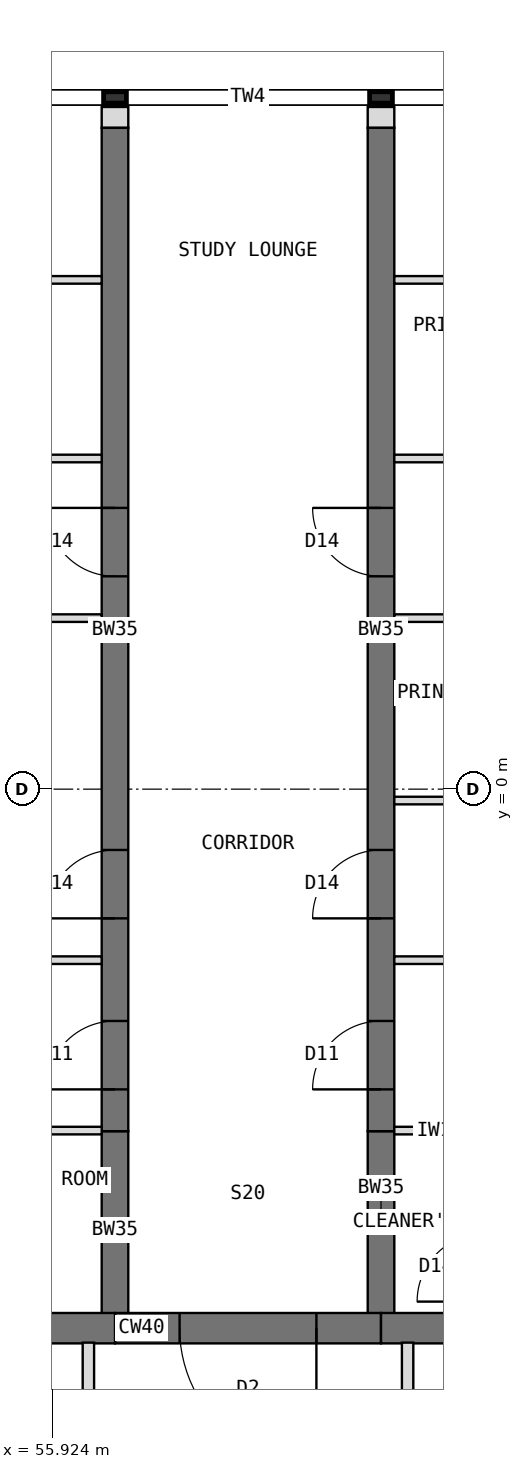
"""IFC4 building model, lengths in metres.
Left out: names, types, materials, properties, quantities, classifications, styles, units other than length and angle.
Written with IfcOpenShell. Run it as: python <this file> out.ifc"""

import sys

from ifc_helpers import new_model, si_unit, direction, frame, frame_2d, origin, place, context, subcontext, project, spatial, rectangle, extrude, element, fill, save


model = new_model("IFC4")
c1 = context("Model", 3, precision=1e-05, world=origin(), true_north=direction((0.0, 1.0)))
c2 = subcontext(c1, "Body", "Model", "MODEL_VIEW")
j1 = project(units=[si_unit("LENGTHUNIT", "METRE"), si_unit("PLANEANGLEUNIT", "RADIAN")], contexts=[c1])
p1 = place(None, origin())
s1 = spatial("IfcSite", under=j1, at=p1, CompositionType="ELEMENT")
p2 = place(p1, origin())
s2 = spatial("IfcBuilding", under=s1, at=p2, CompositionType="ELEMENT")
p3 = place(p2, frame((0.0, 0.0, 287.5)))
s3 = spatial("IfcBuildingStorey", under=s2, at=p3, CompositionType="ELEMENT", Elevation=287.5)
p4 = place(p3, frame((64.798, -7.092, 0.0), z_axis=(0.0, 0.0, 1.0), x_axis=(-1.0, 0.0, 0.0)))
e1 = element("IfcWall", 1, at=p4, inside=s3, PredefinedType="SHEAR", context=c2, shape_type="SweptSolid", body=[
    extrude(rectangle(XDim=4.548, YDim=0.4, at=frame_2d((2.274, 0.0))), origin(), (0.0, 0.0, 1.0), 4.0),
])
p5 = place(p3, frame((60.25, -7.092, 0.0), z_axis=(0.0, 0.0, 1.0), x_axis=(-1.0, 0.0, 0.0)))
e2 = element("IfcWall", 2, at=p5, inside=s3, PredefinedType="SHEAR", context=c2, shape_type="SweptSolid", body=[
    extrude(rectangle(XDim=3.5, YDim=0.4, at=frame_2d((1.75, 0.0))), origin(), (0.0, 0.0, 1.0), 4.0),
])
p6 = place(p5, frame((0.85, 0.0, 0.0)))
e3 = element("IfcOpeningElement", 3, at=p6, cuts=e2, PredefinedType="OPENING", context=c2, shape_type="SweptSolid", body=[
    extrude(rectangle(XDim=1.8, YDim=2.1, at=frame_2d((0.9, 1.05))), frame((0.0, 0.21, 0.0), z_axis=(0.0, -1.0, 0.0), x_axis=(1.0, 0.0, 0.0)), (0.0, 0.0, 1.0), 0.42),
])
p7 = place(p3, frame((56.75, -7.092, 0.0), z_axis=(0.0, 0.0, 1.0), x_axis=(-1.0, 0.0, 0.0)))
e4 = element("IfcWall", 4, at=p7, inside=s3, PredefinedType="SHEAR", context=c2, shape_type="SweptSolid", body=[
    extrude(rectangle(XDim=4.548, YDim=0.4, at=frame_2d((2.274, 0.0))), origin(), (0.0, 0.0, 1.0), 4.0),
])
p8 = place(p3, frame((56.75, -7.092, 0.0), z_axis=(0.0, 0.0, 1.0), x_axis=(0.0, 1.0, 0.0)))
e5 = element("IfcWall", 5, at=p8, inside=s3, PredefinedType="SHEAR", context=c2, shape_type="SweptSolid", body=[
    extrude(rectangle(XDim=2.592, YDim=0.35, at=frame_2d((1.296, 0.0))), origin(), (0.0, 0.0, 1.0), 4.0),
])
p9 = place(p3, frame((56.75, -4.5, 0.0), z_axis=(0.0, 0.0, 1.0), x_axis=(0.0, 1.0, 0.0)))
e6 = element("IfcWall", 6, at=p9, inside=s3, PredefinedType="SHEAR", context=c2, shape_type="SweptSolid", body=[
    extrude(rectangle(XDim=13.2, YDim=0.35, at=frame_2d((6.6, 0.0))), origin(), (0.0, 0.0, 1.0), 4.0),
])
p10 = place(p9, frame((0.55, 0.0, 0.0)))
e7 = element("IfcOpeningElement", 7, at=p10, cuts=e6, PredefinedType="OPENING", context=c2, shape_type="SweptSolid", body=[
    extrude(rectangle(XDim=0.9, YDim=2.1, at=frame_2d((0.45, 1.05))), frame((0.0, 0.185, 0.0), z_axis=(0.0, -1.0, 0.0), x_axis=(1.0, 0.0, 0.0)), (0.0, 0.0, 1.0), 0.37),
])
p11 = place(p9, frame((2.8, 0.0, 0.0)))
e8 = element("IfcOpeningElement", 8, at=p11, cuts=e6, PredefinedType="OPENING", context=c2, shape_type="SweptSolid", body=[
    extrude(rectangle(XDim=0.9, YDim=2.1, at=frame_2d((0.45, 1.05))), frame((0.0, 0.185, 0.0), z_axis=(0.0, -1.0, 0.0), x_axis=(1.0, 0.0, 0.0)), (0.0, 0.0, 1.0), 0.37),
])
p12 = place(p9, frame((7.3, 0.0, 0.0)))
e9 = element("IfcOpeningElement", 9, at=p12, cuts=e6, PredefinedType="OPENING", context=c2, shape_type="SweptSolid", body=[
    extrude(rectangle(XDim=0.9, YDim=2.1, at=frame_2d((0.45, 1.05))), frame((0.0, 0.185, 0.0), z_axis=(0.0, -1.0, 0.0), x_axis=(1.0, 0.0, 0.0)), (0.0, 0.0, 1.0), 0.37),
])
p13 = place(p3, frame((60.25, -7.092, 0.0), z_axis=(0.0, 0.0, 1.0), x_axis=(0.0, 1.0, 0.0)))
e10 = element("IfcWall", 10, at=p13, inside=s3, PredefinedType="SHEAR", context=c2, shape_type="SweptSolid", body=[
    extrude(rectangle(XDim=2.592, YDim=0.35, at=frame_2d((1.296, 0.0))), origin(), (0.0, 0.0, 1.0), 4.0),
])
p14 = place(p3, frame((60.25, -4.5, 0.0), z_axis=(0.0, 0.0, 1.0), x_axis=(0.0, 1.0, 0.0)))
e11 = element("IfcWall", 11, at=p14, inside=s3, PredefinedType="SHEAR", context=c2, shape_type="SweptSolid", body=[
    extrude(rectangle(XDim=13.2, YDim=0.35, at=frame_2d((6.6, 0.0))), origin(), (0.0, 0.0, 1.0), 4.0),
])
p15 = place(p14, frame((0.55, 0.0, 0.0)))
e12 = element("IfcOpeningElement", 12, at=p15, cuts=e11, PredefinedType="OPENING", context=c2, shape_type="SweptSolid", body=[
    extrude(rectangle(XDim=0.9, YDim=2.1, at=frame_2d((0.45, 1.05))), frame((0.0, 0.185, 0.0), z_axis=(0.0, -1.0, 0.0), x_axis=(1.0, 0.0, 0.0)), (0.0, 0.0, 1.0), 0.37),
])
p16 = place(p14, frame((2.8, 0.0, 0.0)))
e13 = element("IfcOpeningElement", 13, at=p16, cuts=e11, PredefinedType="OPENING", context=c2, shape_type="SweptSolid", body=[
    extrude(rectangle(XDim=0.9, YDim=2.1, at=frame_2d((0.45, 1.05))), frame((0.0, 0.185, 0.0), z_axis=(0.0, -1.0, 0.0), x_axis=(1.0, 0.0, 0.0)), (0.0, 0.0, 1.0), 0.37),
])
p17 = place(p14, frame((7.3, 0.0, 0.0)))
e14 = element("IfcOpeningElement", 14, at=p17, cuts=e11, PredefinedType="OPENING", context=c2, shape_type="SweptSolid", body=[
    extrude(rectangle(XDim=0.9, YDim=2.1, at=frame_2d((0.45, 1.05))), frame((0.0, 0.185, 0.0), z_axis=(0.0, -1.0, 0.0), x_axis=(1.0, 0.0, 0.0)), (0.0, 0.0, 1.0), 0.37),
])
for number, where, z_axis, x_axis in (
    (15, (56.75, 8.7, 0.0), (0.0, 0.0, 1.0), (0.0, 1.0, 0.0)),
    (16, (60.25, 8.7, 0.0), (0.0, 0.0, 1.0), (0.0, 1.0, 0.0)),
):
    element("IfcWall", number, at=place(p3, frame(where, z_axis=z_axis, x_axis=x_axis)), inside=s3, PredefinedType="PARTITIONING", context=c2, shape_type="SweptSolid", body=[
        extrude(rectangle(XDim=0.275, YDim=0.35, at=frame_2d((0.138, 0.0))), origin(), (0.0, 0.0, 1.0), 3.7),
    ])
for number, where, z_axis, x_axis in (
    (17, (56.575, -2.25, 0.0), (0.0, 0.0, 1.0), (-1.0, 0.0, 0.0)),
    (18, (56.575, 2.25, 0.0), (0.0, 0.0, 1.0), (-1.0, 0.0, 0.0)),
):
    element("IfcWall", number, at=place(p3, frame(where, z_axis=z_axis, x_axis=x_axis)), inside=s3, PredefinedType="PARTITIONING", context=c2, shape_type="SweptSolid", body=[
        extrude(rectangle(XDim=4.825, YDim=0.1, at=frame_2d((2.413, 0.0))), origin(), (0.0, 0.0, 1.0), 3.7),
    ])
p18 = place(p3, frame((56.575, 4.35, 0.0), z_axis=(0.0, 0.0, 1.0), x_axis=(-1.0, 0.0, 0.0)))
e19 = element("IfcWall", 19, at=p18, inside=s3, PredefinedType="PARTITIONING", context=c2, shape_type="SweptSolid", body=[
    extrude(rectangle(XDim=3.4, YDim=0.1, at=frame_2d((1.7, 0.0))), origin(), (0.0, 0.0, 1.0), 3.7),
])
p19 = place(p18, frame((1.25, 0.0, 0.0)))
e20 = element("IfcOpeningElement", 20, at=p19, cuts=e19, PredefinedType="OPENING", context=c2, shape_type="SweptSolid", body=[
    extrude(rectangle(XDim=0.9, YDim=2.1, at=frame_2d((0.45, 1.05))), frame((0.0, 0.06, 0.0), z_axis=(0.0, -1.0, 0.0), x_axis=(1.0, 0.0, 0.0)), (0.0, 0.0, 1.0), 0.12),
])
p20 = place(p3, frame((56.575, 6.7, 0.0), z_axis=(0.0, 0.0, 1.0), x_axis=(-1.0, 0.0, 0.0)))
e21 = element("IfcWall", 21, at=p20, inside=s3, PredefinedType="PARTITIONING", context=c2, shape_type="SweptSolid", body=[
    extrude(rectangle(XDim=3.4, YDim=0.1, at=frame_2d((1.7, 0.0))), origin(), (0.0, 0.0, 1.0), 3.7),
])
p21 = place(p3, frame((56.575, -4.492, 0.0), z_axis=(0.0, 0.0, 1.0), x_axis=(-1.0, 0.0, 0.0)))
e22 = element("IfcWall", 22, at=p21, inside=s3, PredefinedType="PARTITIONING", context=c2, shape_type="SweptSolid", body=[
    extrude(rectangle(XDim=3.2, YDim=0.1, at=frame_2d((1.6, 0.0))), origin(), (0.0, 0.0, 1.0), 3.167),
])
for number, where, z_axis, x_axis in (
    (23, (60.425, -2.25, 0.0), (0.0, 0.0, 1.0), (1.0, 0.0, 0.0)),
    (24, (60.425, 2.25, 0.0), (0.0, 0.0, 1.0), (1.0, 0.0, 0.0)),
):
    element("IfcWall", number, at=place(p3, frame(where, z_axis=z_axis, x_axis=x_axis)), inside=s3, PredefinedType="PARTITIONING", context=c2, shape_type="SweptSolid", body=[
        extrude(rectangle(XDim=4.825, YDim=0.1, at=frame_2d((2.413, 0.0))), origin(), (0.0, 0.0, 1.0), 3.7),
    ])
p22 = place(p3, frame((60.425, -0.15, 0.0), z_axis=(0.0, 0.0, 1.0), x_axis=(1.0, 0.0, 0.0)))
e25 = element("IfcWall", 25, at=p22, inside=s3, PredefinedType="PARTITIONING", context=c2, shape_type="SweptSolid", body=[
    extrude(rectangle(XDim=3.4, YDim=0.1, at=frame_2d((1.7, 0.0))), origin(), (0.0, 0.0, 1.0), 3.7),
])
p23 = place(p22, frame((1.25, 0.0, 0.0)))
e26 = element("IfcOpeningElement", 26, at=p23, cuts=e25, PredefinedType="OPENING", context=c2, shape_type="SweptSolid", body=[
    extrude(rectangle(XDim=0.9, YDim=2.1, at=frame_2d((0.45, 1.05))), frame((0.0, 0.06, 0.0), z_axis=(0.0, -1.0, 0.0), x_axis=(1.0, 0.0, 0.0)), (0.0, 0.0, 1.0), 0.12),
])
p24 = place(p3, frame((60.425, 4.35, 0.0), z_axis=(0.0, 0.0, 1.0), x_axis=(1.0, 0.0, 0.0)))
e27 = element("IfcWall", 27, at=p24, inside=s3, PredefinedType="PARTITIONING", context=c2, shape_type="SweptSolid", body=[
    extrude(rectangle(XDim=3.4, YDim=0.1, at=frame_2d((1.7, 0.0))), origin(), (0.0, 0.0, 1.0), 3.7),
])
p25 = place(p24, frame((1.25, 0.0, 0.0)))
e28 = element("IfcOpeningElement", 28, at=p25, cuts=e27, PredefinedType="OPENING", context=c2, shape_type="SweptSolid", body=[
    extrude(rectangle(XDim=0.9, YDim=2.1, at=frame_2d((0.45, 1.05))), frame((0.0, 0.06, 0.0), z_axis=(0.0, -1.0, 0.0), x_axis=(1.0, 0.0, 0.0)), (0.0, 0.0, 1.0), 0.12),
])
p26 = place(p3, frame((60.425, 6.7, 0.0), z_axis=(0.0, 0.0, 1.0), x_axis=(1.0, 0.0, 0.0)))
e29 = element("IfcWall", 29, at=p26, inside=s3, PredefinedType="PARTITIONING", context=c2, shape_type="SweptSolid", body=[
    extrude(rectangle(XDim=3.4, YDim=0.1, at=frame_2d((1.7, 0.0))), origin(), (0.0, 0.0, 1.0), 3.7),
])
p27 = place(p3, frame((60.425, -4.492, 0.0), z_axis=(0.0, 0.0, 1.0), x_axis=(1.0, 0.0, 0.0)))
e30 = element("IfcWall", 30, at=p27, inside=s3, PredefinedType="PARTITIONING", context=c2, shape_type="SweptSolid", body=[
    extrude(rectangle(XDim=1.2, YDim=0.1, at=frame_2d((0.6, 0.0))), origin(), (0.0, 0.0, 1.0), 3.167),
])
p28 = place(p3, frame((56.4, -11.857, 0.0), z_axis=(0.0, 0.0, 1.0), x_axis=(0.0, 1.0, 0.0)))
e31 = element("IfcWall", 31, at=p28, inside=s3, PredefinedType="PARTITIONING", context=c2, shape_type="SweptSolid", body=[
    extrude(rectangle(XDim=4.576, YDim=0.15, at=frame_2d((2.288, 0.0))), origin(), (0.0, 0.0, 1.0), 3.7),
])
p29 = place(p28, frame((0.873, 0.0, 0.0)))
e32 = element("IfcOpeningElement", 32, at=p29, cuts=e31, PredefinedType="OPENING", context=c2, shape_type="SweptSolid", body=[
    extrude(rectangle(XDim=1.0, YDim=2.1, at=frame_2d((0.5, 1.05))), frame((0.0, 0.085, 0.0), z_axis=(0.0, -1.0, 0.0), x_axis=(1.0, 0.0, 0.0)), (0.0, 0.0, 1.0), 0.17),
])
p30 = place(p3, frame((60.6, -7.282, 0.0), z_axis=(0.0, 0.0, 1.0), x_axis=(0.0, -1.0, 0.0)))
e33 = element("IfcWall", 33, at=p30, inside=s3, PredefinedType="PARTITIONING", context=c2, shape_type="SweptSolid", body=[
    extrude(rectangle(XDim=4.576, YDim=0.15, at=frame_2d((2.288, 0.0))), origin(), (0.0, 0.0, 1.0), 3.7),
])
p31 = place(p30, frame((2.703, 0.0, 0.0)))
e34 = element("IfcOpeningElement", 34, at=p31, cuts=e33, PredefinedType="OPENING", context=c2, shape_type="SweptSolid", body=[
    extrude(rectangle(XDim=1.0, YDim=2.1, at=frame_2d((0.5, 1.05))), frame((0.0, 0.085, 0.0), z_axis=(0.0, -1.0, 0.0), x_axis=(1.0, 0.0, 0.0)), (0.0, 0.0, 1.0), 0.17),
])
p32 = place(p6, origin())
e35 = element("IfcDoor", 35, at=p32, inside=s3, OperationType="DOUBLE_DOOR_DOUBLE_SWING", PredefinedType="DOOR", context=c2, shape_type="SweptSolid", body=[
    extrude(rectangle(XDim=1.8, YDim=2.1, at=frame_2d((0.9, 1.05))), frame((0.0, 0.025, 0.0), z_axis=(0.0, -1.0, 0.0), x_axis=(1.0, 0.0, 0.0)), (0.0, 0.0, 1.0), 0.05),
])
fill(e3, e35)
p33 = place(p10, origin())
e36 = element("IfcDoor", 36, at=p33, inside=s3, OperationType="SINGLE_SWING_LEFT", PredefinedType="DOOR", context=c2, shape_type="SweptSolid", body=[
    extrude(rectangle(XDim=0.9, YDim=2.1, at=frame_2d((0.45, 1.05))), frame((0.0, 0.025, 0.0), z_axis=(0.0, -1.0, 0.0), x_axis=(1.0, 0.0, 0.0)), (0.0, 0.0, 1.0), 0.05),
])
fill(e7, e36)
p34 = place(p11, origin())
e37 = element("IfcDoor", 37, at=p34, inside=s3, OperationType="SINGLE_SWING_LEFT", PredefinedType="DOOR", context=c2, shape_type="SweptSolid", body=[
    extrude(rectangle(XDim=0.9, YDim=2.1, at=frame_2d((0.45, 1.05))), frame((0.0, 0.025, 0.0), z_axis=(0.0, -1.0, 0.0), x_axis=(1.0, 0.0, 0.0)), (0.0, 0.0, 1.0), 0.05),
])
fill(e8, e37)
p35 = place(p12, origin())
e38 = element("IfcDoor", 38, at=p35, inside=s3, OperationType="SINGLE_SWING_RIGHT", PredefinedType="DOOR", context=c2, shape_type="SweptSolid", body=[
    extrude(rectangle(XDim=0.9, YDim=2.1, at=frame_2d((0.45, 1.05))), frame((0.0, 0.025, 0.0), z_axis=(0.0, -1.0, 0.0), x_axis=(1.0, 0.0, 0.0)), (0.0, 0.0, 1.0), 0.05),
])
fill(e9, e38)
p36 = place(p15, origin())
e39 = element("IfcDoor", 39, at=p36, inside=s3, OperationType="SINGLE_SWING_LEFT", PredefinedType="DOOR", context=c2, shape_type="SweptSolid", body=[
    extrude(rectangle(XDim=0.9, YDim=2.1, at=frame_2d((0.45, 1.05))), frame((0.0, 0.025, 0.0), z_axis=(0.0, -1.0, 0.0), x_axis=(1.0, 0.0, 0.0)), (0.0, 0.0, 1.0), 0.05),
])
fill(e12, e39)
p37 = place(p16, origin())
e40 = element("IfcDoor", 40, at=p37, inside=s3, OperationType="SINGLE_SWING_LEFT", PredefinedType="DOOR", context=c2, shape_type="SweptSolid", body=[
    extrude(rectangle(XDim=0.9, YDim=2.1, at=frame_2d((0.45, 1.05))), frame((0.0, 0.025, 0.0), z_axis=(0.0, -1.0, 0.0), x_axis=(1.0, 0.0, 0.0)), (0.0, 0.0, 1.0), 0.05),
])
fill(e13, e40)
p38 = place(p17, origin())
e41 = element("IfcDoor", 41, at=p38, inside=s3, OperationType="SINGLE_SWING_RIGHT", PredefinedType="DOOR", context=c2, shape_type="SweptSolid", body=[
    extrude(rectangle(XDim=0.9, YDim=2.1, at=frame_2d((0.45, 1.05))), frame((0.0, 0.025, 0.0), z_axis=(0.0, -1.0, 0.0), x_axis=(1.0, 0.0, 0.0)), (0.0, 0.0, 1.0), 0.05),
])
fill(e14, e41)
save(model, sys.argv[1])
